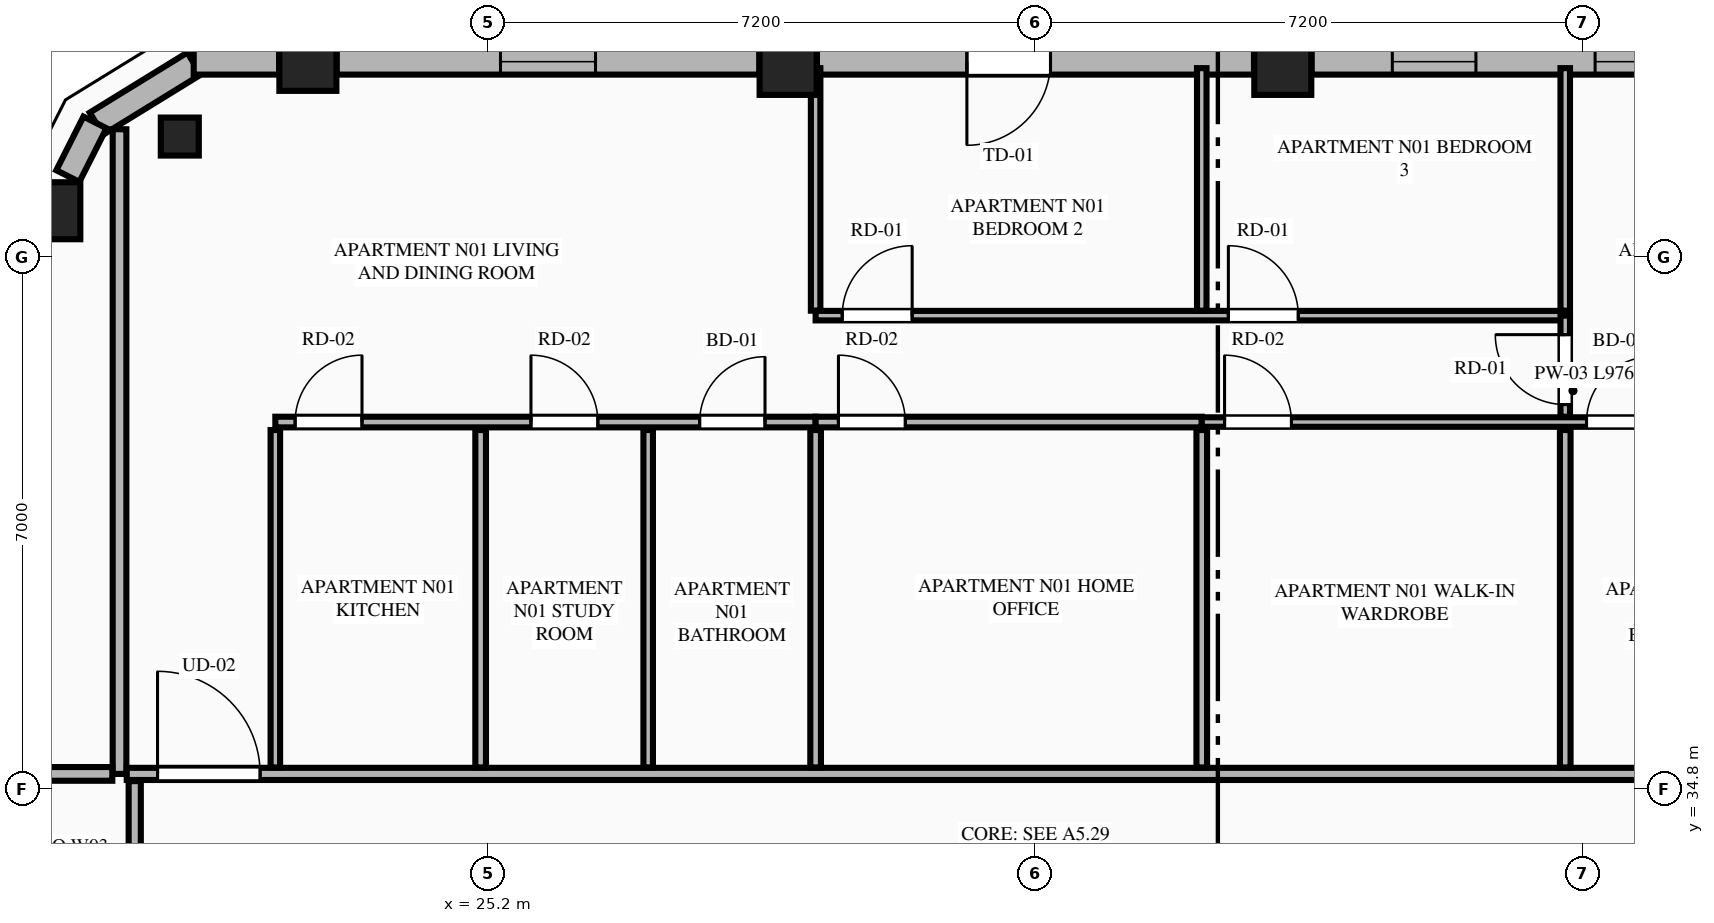
"""IFC4 building model, lengths in metres.
Left out: names, types, materials, properties, quantities, classifications, styles, units other than length and angle.
Written with IfcOpenShell. Run it as: python <this file> out.ifc"""

import sys

from ifc_helpers import new_model, si_unit, direction, frame, frame_2d, origin, origin_2d, place, context, subcontext, project, spatial, rectangle, extrude, element, fill, save


model = new_model("IFC4")
c1 = context("Model", 3, precision=1e-05, world=origin(), true_north=direction((0.0, 1.0)))
c2 = subcontext(c1, "Body", "Model", "MODEL_VIEW")
j1 = project(units=[si_unit("LENGTHUNIT", "METRE"), si_unit("PLANEANGLEUNIT", "RADIAN")], contexts=[c1])
p1 = place(None, origin())
s1 = spatial("IfcSite", under=j1, at=p1, CompositionType="ELEMENT")
p2 = place(p1, origin())
s2 = spatial("IfcBuilding", under=s1, at=p2, CompositionType="ELEMENT")
p3 = place(p2, frame((0.0, 0.0, 241.6)))
s3 = spatial("IfcBuildingStorey", under=s2, at=p3, CompositionType="ELEMENT", Elevation=241.6)
for number, where, z_axis, x_axis in (
    (1, (35.654, 44.308, 0.0), (0.0, 0.0, 1.0), (1.0, 0.0, 0.0)),
    (2, (29.146, 44.308, 0.0), (0.0, 0.0, 1.0), (1.0, 0.0, 0.0)),
    (3, (22.828, 44.361, 0.0), (0.0, 0.0, 1.0), (1.0, 0.0, 0.0)),
    (4, (19.459, 42.409, 0.0), (0.0, 0.0, 1.0), (1.0, 0.0, 0.0)),
):
    element("IfcColumn", number, at=place(p3, frame(where, z_axis=z_axis, x_axis=x_axis)), inside=s3, PredefinedType="COLUMN", context=c2, shape_type="SweptSolid", body=[
        extrude(rectangle(XDim=0.75, YDim=0.75, at=origin_2d()), origin(), (0.0, 0.0, 1.0), 3.65),
    ])
p4 = place(p3, frame((21.143, 43.385, 0.0), z_axis=(0.0, 0.0, 1.0), x_axis=(-0.865256437757, -0.501329529272, 0.0)))
e5 = element("IfcColumn", 5, at=p4, inside=s3, PredefinedType="PILASTER", context=c2, shape_type="SweptSolid", body=[
    extrude(rectangle(XDim=0.5, YDim=0.35, at=origin_2d()), origin(), (0.0, 0.0, 1.0), 3.65),
])
p5 = place(p3, frame((21.331, 44.345, 0.0), z_axis=(0.0, 0.0, 1.0), x_axis=(-0.851680557619, -0.52406128246, 0.0)))
e6 = element("IfcWall", 6, at=p5, inside=s3, PredefinedType="STANDARD", context=c2, shape_type="SweptSolid", body=[
    extrude(rectangle(XDim=1.508, YDim=0.34, at=frame_2d((0.754, 0.0))), origin(), (0.0, 0.0, 1.0), 3.45),
])
p6 = place(p3, frame((41.593, 44.37, 0.0), z_axis=(0.0, 0.0, 1.0), x_axis=(-1.0, 0.0, 0.0)))
e7 = element("IfcWall", 7, at=p6, inside=s3, PredefinedType="STANDARD", context=c2, shape_type="SweptSolid", body=[
    extrude(rectangle(XDim=5.56, YDim=0.34, at=frame_2d((2.78, 0.0))), origin(), (0.0, 0.0, 1.0), 2.983),
])
p7 = place(p6, frame((0.28, 0.0, 0.75)))
e8 = element("IfcOpeningElement", 8, at=p7, cuts=e7, PredefinedType="OPENING", context=c2, shape_type="SweptSolid", body=[
    extrude(rectangle(XDim=1.55, YDim=2.05, at=frame_2d((0.775, 1.025))), frame((0.0, 0.18, 0.0), z_axis=(0.0, -1.0, 0.0), x_axis=(1.0, 0.0, 0.0)), (0.0, 0.0, 1.0), 0.36),
])
p8 = place(p6, frame((3.398, 0.0, 0.75)))
e9 = element("IfcOpeningElement", 9, at=p8, cuts=e7, PredefinedType="OPENING", context=c2, shape_type="SweptSolid", body=[
    extrude(rectangle(XDim=1.1, YDim=2.0, at=frame_2d((0.55, 1.0))), frame((0.0, 0.18, 0.0), z_axis=(0.0, -1.0, 0.0), x_axis=(1.0, 0.0, 0.0)), (0.0, 0.0, 1.0), 0.36),
])
p9 = place(p3, frame((35.275, 44.37, 0.0), z_axis=(0.0, 0.0, 1.0), x_axis=(-1.0, 0.0, 0.0)))
e10 = element("IfcWall", 10, at=p9, inside=s3, PredefinedType="STANDARD", context=c2, shape_type="SweptSolid", body=[
    extrude(rectangle(XDim=5.75, YDim=0.34, at=frame_2d((2.875, 0.0))), origin(), (0.0, 0.0, 1.0), 2.983),
])
p10 = place(p9, frame((2.677, 0.0, 0.0)))
e11 = element("IfcOpeningElement", 11, at=p10, cuts=e10, PredefinedType="OPENING", context=c2, shape_type="SweptSolid", body=[
    extrude(rectangle(XDim=1.1, YDim=2.25, at=frame_2d((0.55, 1.125))), frame((0.0, 0.18, 0.0), z_axis=(0.0, -1.0, 0.0), x_axis=(1.0, 0.0, 0.0)), (0.0, 0.0, 1.0), 0.36),
])
p11 = place(p3, frame((28.767, 44.37, 0.0), z_axis=(0.0, 0.0, 1.0), x_axis=(-1.0, 0.0, 0.0)))
e12 = element("IfcWall", 12, at=p11, inside=s3, PredefinedType="STANDARD", context=c2, shape_type="SweptSolid", body=[
    extrude(rectangle(XDim=5.56, YDim=0.34, at=frame_2d((2.78, 0.0))), origin(), (0.0, 0.0, 1.0), 2.983),
])
p12 = place(p11, frame((2.155, 0.0, 0.75)))
e13 = element("IfcOpeningElement", 13, at=p12, cuts=e12, PredefinedType="OPENING", context=c2, shape_type="SweptSolid", body=[
    extrude(rectangle(XDim=1.25, YDim=1.95, at=frame_2d((0.625, 0.975))), frame((0.0, 0.18, 0.0), z_axis=(0.0, -1.0, 0.0), x_axis=(1.0, 0.0, 0.0)), (0.0, 0.0, 1.0), 0.36),
])
p13 = place(p3, frame((22.449, 44.37, 0.0), z_axis=(0.0, 0.0, 1.0), x_axis=(-1.0, 0.0, 0.0)))
e14 = element("IfcWall", 14, at=p13, inside=s3, PredefinedType="STANDARD", context=c2, shape_type="SweptSolid", body=[
    extrude(rectangle(XDim=1.123, YDim=0.34, at=frame_2d((0.562, 0.0))), origin(), (0.0, 0.0, 1.0), 3.45),
])
p14 = place(p3, frame((20.027, 43.571, 0.0), z_axis=(0.0, 0.0, 1.0), x_axis=(-0.451404919072, -0.89231922485, 0.0)))
e15 = element("IfcWall", 15, at=p14, inside=s3, PredefinedType="STANDARD", context=c2, shape_type="SweptSolid", body=[
    extrude(rectangle(XDim=0.791, YDim=0.34, at=frame_2d((0.396, 0.0))), origin(), (0.0, 0.0, 1.0), 3.45),
])
p15 = place(p3, frame((20.35, 35.0, 0.0), z_axis=(0.0, 0.0, 1.0), x_axis=(0.0, 1.0, 0.0)))
e16 = element("IfcWall", 16, at=p15, inside=s3, PredefinedType="PARTITIONING", context=c2, shape_type="SweptSolid", body=[
    extrude(rectangle(XDim=8.481, YDim=0.18, at=frame_2d((4.24, 0.0))), origin(), (0.0, 0.0, 1.0), 3.45),
])
p16 = place(p3, frame((20.445, 35.0, 0.0), z_axis=(0.0, 0.0, 1.0), x_axis=(1.0, 0.0, 0.0)))
e17 = element("IfcWall", 17, at=p16, inside=s3, PredefinedType="PARTITIONING", context=c2, shape_type="SweptSolid", body=[
    extrude(rectangle(XDim=23.91, YDim=0.16, at=frame_2d((11.955, 0.0))), origin(), (0.0, 0.0, 1.0), 3.45),
])
p17 = place(p16, frame((0.405, 0.0, 0.0)))
e18 = element("IfcOpeningElement", 18, at=p17, cuts=e17, PredefinedType="OPENING", context=c2, shape_type="SweptSolid", body=[
    extrude(rectangle(XDim=1.35, YDim=2.35, at=frame_2d((0.675, 1.175))), frame((0.0, 0.09, 0.0), z_axis=(0.0, -1.0, 0.0), x_axis=(1.0, 0.0, 0.0)), (0.0, 0.0, 1.0), 0.18),
])
p18 = place(p3, frame((22.4, 35.085, 0.0), z_axis=(0.0, 0.0, 1.0), x_axis=(0.0, 1.0, 0.0)))
e19 = element("IfcWall", 19, at=p18, inside=s3, PredefinedType="PARTITIONING", context=c2, shape_type="SweptSolid", body=[
    extrude(rectangle(XDim=4.439, YDim=0.125, at=frame_2d((2.219, 0.0))), origin(), (0.0, 0.0, 1.0), 3.45),
])
p19 = place(p3, frame((22.4, 39.629, 0.0), z_axis=(0.0, 0.0, 1.0), x_axis=(1.0, 0.0, 0.0)))
e20 = element("IfcWall", 20, at=p19, inside=s3, PredefinedType="PLUMBINGWALL", context=c2, shape_type="SweptSolid", body=[
    extrude(rectangle(XDim=7.108, YDim=0.14, at=frame_2d((3.554, 0.0))), origin(), (0.0, 0.0, 1.0), 3.45),
])
p20 = place(p19, frame((5.582, 0.0, 0.0)))
e21 = element("IfcOpeningElement", 21, at=p20, cuts=e20, PredefinedType="OPENING", context=c2, shape_type="SweptSolid", body=[
    extrude(rectangle(XDim=0.86, YDim=2.1, at=frame_2d((0.43, 1.05))), frame((0.0, 0.08, 0.0), z_axis=(0.0, -1.0, 0.0), x_axis=(1.0, 0.0, 0.0)), (0.0, 0.0, 1.0), 0.16),
])
p21 = place(p19, frame((0.26, 0.0, 0.0)))
e22 = element("IfcOpeningElement", 22, at=p21, cuts=e20, PredefinedType="OPENING", context=c2, shape_type="SweptSolid", body=[
    extrude(rectangle(XDim=0.88, YDim=2.15, at=frame_2d((0.44, 1.075))), frame((0.0, 0.08, 0.0), z_axis=(0.0, -1.0, 0.0), x_axis=(1.0, 0.0, 0.0)), (0.0, 0.0, 1.0), 0.16),
])
p22 = place(p19, frame((3.363, 0.0, 0.0)))
e23 = element("IfcOpeningElement", 23, at=p22, cuts=e20, PredefinedType="OPENING", context=c2, shape_type="SweptSolid", body=[
    extrude(rectangle(XDim=0.88, YDim=2.15, at=frame_2d((0.44, 1.075))), frame((0.0, 0.08, 0.0), z_axis=(0.0, -1.0, 0.0), x_axis=(1.0, 0.0, 0.0)), (0.0, 0.0, 1.0), 0.16),
])
p23 = place(p3, frame((29.508, 39.629, 0.0), z_axis=(0.0, 0.0, 1.0), x_axis=(1.0, 0.0, 0.0)))
e24 = element("IfcWall", 24, at=p23, inside=s3, PredefinedType="PLUMBINGWALL", context=c2, shape_type="SweptSolid", body=[
    extrude(rectangle(XDim=5.08, YDim=0.14, at=frame_2d((2.54, 0.0))), origin(), (0.0, 0.0, 1.0), 3.45),
])
p24 = place(p23, frame((0.3, 0.0, 0.0)))
e25 = element("IfcOpeningElement", 25, at=p24, cuts=e24, PredefinedType="OPENING", context=c2, shape_type="SweptSolid", body=[
    extrude(rectangle(XDim=0.88, YDim=2.15, at=frame_2d((0.44, 1.075))), frame((0.0, 0.08, 0.0), z_axis=(0.0, -1.0, 0.0), x_axis=(1.0, 0.0, 0.0)), (0.0, 0.0, 1.0), 0.16),
])
p25 = place(p3, frame((34.588, 39.629, 0.0), z_axis=(0.0, 0.0, 1.0), x_axis=(1.0, 0.0, 0.0)))
e26 = element("IfcWall", 26, at=p25, inside=s3, PredefinedType="PARTITIONING", context=c2, shape_type="SweptSolid", body=[
    extrude(rectangle(XDim=9.767, YDim=0.125, at=frame_2d((4.884, 0.0))), origin(), (0.0, 0.0, 1.0), 3.45),
])
p26 = place(p25, frame((5.062, 0.0, 0.0)))
e27 = element("IfcOpeningElement", 27, at=p26, cuts=e26, PredefinedType="OPENING", context=c2, shape_type="SweptSolid", body=[
    extrude(rectangle(XDim=0.86, YDim=2.1, at=frame_2d((0.43, 1.05))), frame((0.0, 0.073, 0.0), z_axis=(0.0, -1.0, 0.0), x_axis=(1.0, 0.0, 0.0)), (0.0, 0.0, 1.0), 0.145),
])
p27 = place(p25, frame((8.15, 0.0, 0.0)))
e28 = element("IfcOpeningElement", 28, at=p27, cuts=e26, PredefinedType="OPENING", context=c2, shape_type="SweptSolid", body=[
    extrude(rectangle(XDim=0.88, YDim=2.15, at=frame_2d((0.44, 1.075))), frame((0.0, 0.073, 0.0), z_axis=(0.0, -1.0, 0.0), x_axis=(1.0, 0.0, 0.0)), (0.0, 0.0, 1.0), 0.145),
])
p28 = place(p25, frame((0.3, 0.0, 0.0)))
e29 = element("IfcOpeningElement", 29, at=p28, cuts=e26, PredefinedType="OPENING", context=c2, shape_type="SweptSolid", body=[
    extrude(rectangle(XDim=0.88, YDim=2.15, at=frame_2d((0.44, 1.075))), frame((0.0, 0.073, 0.0), z_axis=(0.0, -1.0, 0.0), x_axis=(1.0, 0.0, 0.0)), (0.0, 0.0, 1.0), 0.145),
])
p29 = place(p3, frame((25.101, 35.085, 0.0), z_axis=(0.0, 0.0, 1.0), x_axis=(0.0, 1.0, 0.0)))
e30 = element("IfcWall", 30, at=p29, inside=s3, PredefinedType="PLUMBINGWALL", context=c2, shape_type="SweptSolid", body=[
    extrude(rectangle(XDim=4.439, YDim=0.14, at=frame_2d((2.219, 0.0))), origin(), (0.0, 0.0, 1.0), 3.45),
])
p30 = place(p3, frame((27.305, 35.085, 0.0), z_axis=(0.0, 0.0, 1.0), x_axis=(0.0, 1.0, 0.0)))
e31 = element("IfcWall", 31, at=p30, inside=s3, PredefinedType="PARTITIONING", context=c2, shape_type="SweptSolid", body=[
    extrude(rectangle(XDim=4.439, YDim=0.125, at=frame_2d((2.219, 0.0))), origin(), (0.0, 0.0, 1.0), 3.45),
])
p31 = place(p3, frame((29.508, 41.094, 0.0), z_axis=(0.0, 0.0, 1.0), x_axis=(0.0, 1.0, 0.0)))
e32 = element("IfcWall", 32, at=p31, inside=s3, PredefinedType="PARTITIONING", context=c2, shape_type="SweptSolid", body=[
    extrude(rectangle(XDim=3.191, YDim=0.125, at=frame_2d((1.595, 0.0))), origin(), (0.0, 0.0, 1.0), 3.45),
])
p32 = place(p3, frame((29.508, 41.029, 0.0), z_axis=(0.0, 0.0, 1.0), x_axis=(1.0, 0.0, 0.0)))
e33 = element("IfcWall", 33, at=p32, inside=s3, PredefinedType="PARTITIONING", context=c2, shape_type="SweptSolid", body=[
    extrude(rectangle(XDim=9.862, YDim=0.125, at=frame_2d((4.931, 0.0))), origin(), (0.0, 0.0, 1.0), 3.45),
])
p33 = place(p32, frame((0.35, 0.0, 0.0)))
e34 = element("IfcOpeningElement", 34, at=p33, cuts=e33, PredefinedType="OPENING", context=c2, shape_type="SweptSolid", body=[
    extrude(rectangle(XDim=0.92, YDim=2.15, at=frame_2d((0.46, 1.075))), frame((0.0, 0.073, 0.0), z_axis=(0.0, -1.0, 0.0), x_axis=(1.0, 0.0, 0.0)), (0.0, 0.0, 1.0), 0.145),
])
p34 = place(p32, frame((5.43, 0.0, 0.0)))
e35 = element("IfcOpeningElement", 35, at=p34, cuts=e33, PredefinedType="OPENING", context=c2, shape_type="SweptSolid", body=[
    extrude(rectangle(XDim=0.92, YDim=2.15, at=frame_2d((0.46, 1.075))), frame((0.0, 0.073, 0.0), z_axis=(0.0, -1.0, 0.0), x_axis=(1.0, 0.0, 0.0)), (0.0, 0.0, 1.0), 0.145),
])
p35 = place(p3, frame((39.37, 39.699, 0.0), z_axis=(0.0, 0.0, 1.0), x_axis=(0.0, 1.0, 0.0)))
e36 = element("IfcWall", 36, at=p35, inside=s3, PredefinedType="PARTITIONING", context=c2, shape_type="SweptSolid", body=[
    extrude(rectangle(XDim=1.33, YDim=0.125, at=frame_2d((0.665, 0.0))), origin(), (0.0, 0.0, 1.0), 3.45),
])
p36 = place(p35, frame((0.16, 0.0, 0.0)))
e37 = element("IfcOpeningElement", 37, at=p36, cuts=e36, PredefinedType="OPENING", context=c2, shape_type="SweptSolid", body=[
    extrude(rectangle(XDim=0.92, YDim=2.15, at=frame_2d((0.46, 1.075))), frame((0.0, 0.073, 0.0), z_axis=(0.0, -1.0, 0.0), x_axis=(1.0, 0.0, 0.0)), (0.0, 0.0, 1.0), 0.145),
])
for number, where, z_axis, x_axis in (
    (38, (29.508, 35.085, 0.0), (0.0, 0.0, 1.0), (0.0, 1.0, 0.0)),
    (39, (34.588, 35.085, 0.0), (0.0, 0.0, 1.0), (0.0, 1.0, 0.0)),
):
    element("IfcWall", number, at=place(p3, frame(where, z_axis=z_axis, x_axis=x_axis)), inside=s3, PredefinedType="PLUMBINGWALL", context=c2, shape_type="SweptSolid", body=[
        extrude(rectangle(XDim=4.439, YDim=0.14, at=frame_2d((2.219, 0.0))), origin(), (0.0, 0.0, 1.0), 3.45),
    ])
for number, where, z_axis, x_axis in (
    (40, (34.588, 41.094, 0.0), (0.0, 0.0, 1.0), (0.0, 1.0, 0.0)),
    (41, (39.37, 41.094, 0.0), (0.0, 0.0, 1.0), (0.0, 1.0, 0.0)),
):
    element("IfcWall", number, at=place(p3, frame(where, z_axis=z_axis, x_axis=x_axis)), inside=s3, PredefinedType="PARTITIONING", context=c2, shape_type="SweptSolid", body=[
        extrude(rectangle(XDim=3.191, YDim=0.125, at=frame_2d((1.595, 0.0))), origin(), (0.0, 0.0, 1.0), 3.45),
    ])
p37 = place(p3, frame((39.37, 35.085, 0.0), z_axis=(0.0, 0.0, 1.0), x_axis=(0.0, 1.0, 0.0)))
e42 = element("IfcWall", 42, at=p37, inside=s3, PredefinedType="PLUMBINGWALL", context=c2, shape_type="SweptSolid", body=[
    extrude(rectangle(XDim=4.439, YDim=0.14, at=frame_2d((2.219, 0.0))), origin(), (0.0, 0.0, 1.0), 3.45),
])
p38 = place(p3, frame((15.933, 35.0, 0.0), z_axis=(0.0, 0.0, 1.0), x_axis=(1.0, 0.0, 0.0)))
e43 = element("IfcWall", 43, at=p38, inside=s3, PredefinedType="PARTITIONING", context=c2, shape_type="SweptSolid", body=[
    extrude(rectangle(XDim=4.322, YDim=0.18, at=frame_2d((2.161, 0.0))), origin(), (0.0, 0.0, 1.0), 3.45),
])
p39 = place(p3, frame((20.55, 28.957, 0.0), z_axis=(0.0, 0.0, 1.0), x_axis=(0.0, 1.0, 0.0)))
e44 = element("IfcWall", 44, at=p39, inside=s3, PredefinedType="PARTITIONING", context=c2, shape_type="SweptSolid", body=[
    extrude(rectangle(XDim=5.948, YDim=0.16, at=frame_2d((2.974, 0.0))), origin(), (0.0, 0.0, 1.0), 3.137),
])
p40 = place(p39, frame((0.4, 0.0, 0.0)))
e45 = element("IfcOpeningElement", 45, at=p40, cuts=e44, PredefinedType="OPENING", context=c2, shape_type="SweptSolid", body=[
    extrude(rectangle(XDim=1.02, YDim=2.25, at=frame_2d((0.51, 1.125))), frame((0.0, 0.09, 0.0), z_axis=(0.0, -1.0, 0.0), x_axis=(1.0, 0.0, 0.0)), (0.0, 0.0, 1.0), 0.18),
])
p41 = place(p7, origin())
e46 = element("IfcWindow", 46, at=p41, inside=s3, PartitioningType="SINGLE_PANEL", PredefinedType="WINDOW", context=c2, shape_type="SweptSolid", body=[
    extrude(rectangle(XDim=1.55, YDim=2.05, at=frame_2d((0.775, 1.025))), frame((0.0, 0.03, 0.0), z_axis=(0.0, -1.0, 0.0), x_axis=(1.0, 0.0, 0.0)), (0.0, 0.0, 1.0), 0.06),
])
fill(e8, e46)
p42 = place(p10, origin())
e47 = element("IfcDoor", 47, at=p42, inside=s3, OperationType="SINGLE_SWING_RIGHT", PredefinedType="DOOR", context=c2, shape_type="SweptSolid", body=[
    extrude(rectangle(XDim=1.1, YDim=2.25, at=frame_2d((0.55, 1.125))), frame((0.0, 0.025, 0.0), z_axis=(0.0, -1.0, 0.0), x_axis=(1.0, 0.0, 0.0)), (0.0, 0.0, 1.0), 0.05),
])
fill(e11, e47)
p43 = place(p12, origin())
e48 = element("IfcWindow", 48, at=p43, inside=s3, PartitioningType="SINGLE_PANEL", PredefinedType="WINDOW", context=c2, shape_type="SweptSolid", body=[
    extrude(rectangle(XDim=1.25, YDim=1.95, at=frame_2d((0.625, 0.975))), frame((0.0, 0.03, 0.0), z_axis=(0.0, -1.0, 0.0), x_axis=(1.0, 0.0, 0.0)), (0.0, 0.0, 1.0), 0.06),
])
fill(e13, e48)
p44 = place(p20, origin())
e49 = element("IfcDoor", 49, at=p44, inside=s3, OperationType="SINGLE_SWING_RIGHT", PredefinedType="DOOR", context=c2, shape_type="SweptSolid", body=[
    extrude(rectangle(XDim=0.86, YDim=2.1, at=frame_2d((0.43, 1.05))), frame((0.0, 0.025, 0.0), z_axis=(0.0, -1.0, 0.0), x_axis=(1.0, 0.0, 0.0)), (0.0, 0.0, 1.0), 0.05),
])
fill(e21, e49)
p45 = place(p26, origin())
e50 = element("IfcDoor", 50, at=p45, inside=s3, OperationType="SINGLE_SWING_RIGHT", PredefinedType="DOOR", context=c2, shape_type="SweptSolid", body=[
    extrude(rectangle(XDim=0.86, YDim=2.1, at=frame_2d((0.43, 1.05))), frame((0.0, 0.025, 0.0), z_axis=(0.0, -1.0, 0.0), x_axis=(1.0, 0.0, 0.0)), (0.0, 0.0, 1.0), 0.05),
])
fill(e27, e50)
p46 = place(p17, origin())
e51 = element("IfcDoor", 51, at=p46, inside=s3, OperationType="SINGLE_SWING_LEFT", PredefinedType="DOOR", context=c2, shape_type="SweptSolid", body=[
    extrude(rectangle(XDim=1.35, YDim=2.35, at=frame_2d((0.675, 1.175))), frame((0.0, 0.025, 0.0), z_axis=(0.0, -1.0, 0.0), x_axis=(1.0, 0.0, 0.0)), (0.0, 0.0, 1.0), 0.05),
])
fill(e18, e51)
p47 = place(p21, origin())
e52 = element("IfcDoor", 52, at=p47, inside=s3, OperationType="SINGLE_SWING_RIGHT", PredefinedType="DOOR", context=c2, shape_type="SweptSolid", body=[
    extrude(rectangle(XDim=0.88, YDim=2.15, at=frame_2d((0.44, 1.075))), frame((0.0, 0.025, 0.0), z_axis=(0.0, -1.0, 0.0), x_axis=(1.0, 0.0, 0.0)), (0.0, 0.0, 1.0), 0.05),
])
fill(e22, e52)
p48 = place(p22, origin())
e53 = element("IfcDoor", 53, at=p48, inside=s3, OperationType="SINGLE_SWING_LEFT", PredefinedType="DOOR", context=c2, shape_type="SweptSolid", body=[
    extrude(rectangle(XDim=0.88, YDim=2.15, at=frame_2d((0.44, 1.075))), frame((0.0, 0.025, 0.0), z_axis=(0.0, -1.0, 0.0), x_axis=(1.0, 0.0, 0.0)), (0.0, 0.0, 1.0), 0.05),
])
fill(e23, e53)
p49 = place(p24, origin())
e54 = element("IfcDoor", 54, at=p49, inside=s3, OperationType="SINGLE_SWING_LEFT", PredefinedType="DOOR", context=c2, shape_type="SweptSolid", body=[
    extrude(rectangle(XDim=0.88, YDim=2.15, at=frame_2d((0.44, 1.075))), frame((0.0, 0.025, 0.0), z_axis=(0.0, -1.0, 0.0), x_axis=(1.0, 0.0, 0.0)), (0.0, 0.0, 1.0), 0.05),
])
fill(e25, e54)
p50 = place(p33, origin())
e55 = element("IfcDoor", 55, at=p50, inside=s3, OperationType="SINGLE_SWING_RIGHT", PredefinedType="DOOR", context=c2, shape_type="SweptSolid", body=[
    extrude(rectangle(XDim=0.92, YDim=2.15, at=frame_2d((0.46, 1.075))), frame((0.0, 0.025, 0.0), z_axis=(0.0, -1.0, 0.0), x_axis=(1.0, 0.0, 0.0)), (0.0, 0.0, 1.0), 0.05),
])
fill(e34, e55)
p51 = place(p34, origin())
e56 = element("IfcDoor", 56, at=p51, inside=s3, OperationType="SINGLE_SWING_LEFT", PredefinedType="DOOR", context=c2, shape_type="SweptSolid", body=[
    extrude(rectangle(XDim=0.92, YDim=2.15, at=frame_2d((0.46, 1.075))), frame((0.0, 0.025, 0.0), z_axis=(0.0, -1.0, 0.0), x_axis=(1.0, 0.0, 0.0)), (0.0, 0.0, 1.0), 0.05),
])
fill(e35, e56)
p52 = place(p36, origin())
e57 = element("IfcDoor", 57, at=p52, inside=s3, OperationType="SINGLE_SWING_RIGHT", PredefinedType="DOOR", context=c2, shape_type="SweptSolid", body=[
    extrude(rectangle(XDim=0.92, YDim=2.15, at=frame_2d((0.46, 1.075))), frame((0.0, 0.025, 0.0), z_axis=(0.0, -1.0, 0.0), x_axis=(1.0, 0.0, 0.0)), (0.0, 0.0, 1.0), 0.05),
])
fill(e37, e57)
p53 = place(p28, origin())
e58 = element("IfcDoor", 58, at=p53, inside=s3, OperationType="SINGLE_SWING_LEFT", PredefinedType="DOOR", context=c2, shape_type="SweptSolid", body=[
    extrude(rectangle(XDim=0.88, YDim=2.15, at=frame_2d((0.44, 1.075))), frame((0.0, 0.025, 0.0), z_axis=(0.0, -1.0, 0.0), x_axis=(1.0, 0.0, 0.0)), (0.0, 0.0, 1.0), 0.05),
])
fill(e29, e58)
p54 = place(p8, origin())
e59 = element("IfcWindow", 59, at=p54, inside=s3, PartitioningType="SINGLE_PANEL", PredefinedType="WINDOW", context=c2, shape_type="SweptSolid", body=[
    extrude(rectangle(XDim=1.1, YDim=2.0, at=frame_2d((0.55, 1.0))), frame((0.0, 0.03, 0.0), z_axis=(0.0, -1.0, 0.0), x_axis=(1.0, 0.0, 0.0)), (0.0, 0.0, 1.0), 0.06),
])
fill(e9, e59)
save(model, sys.argv[1])
